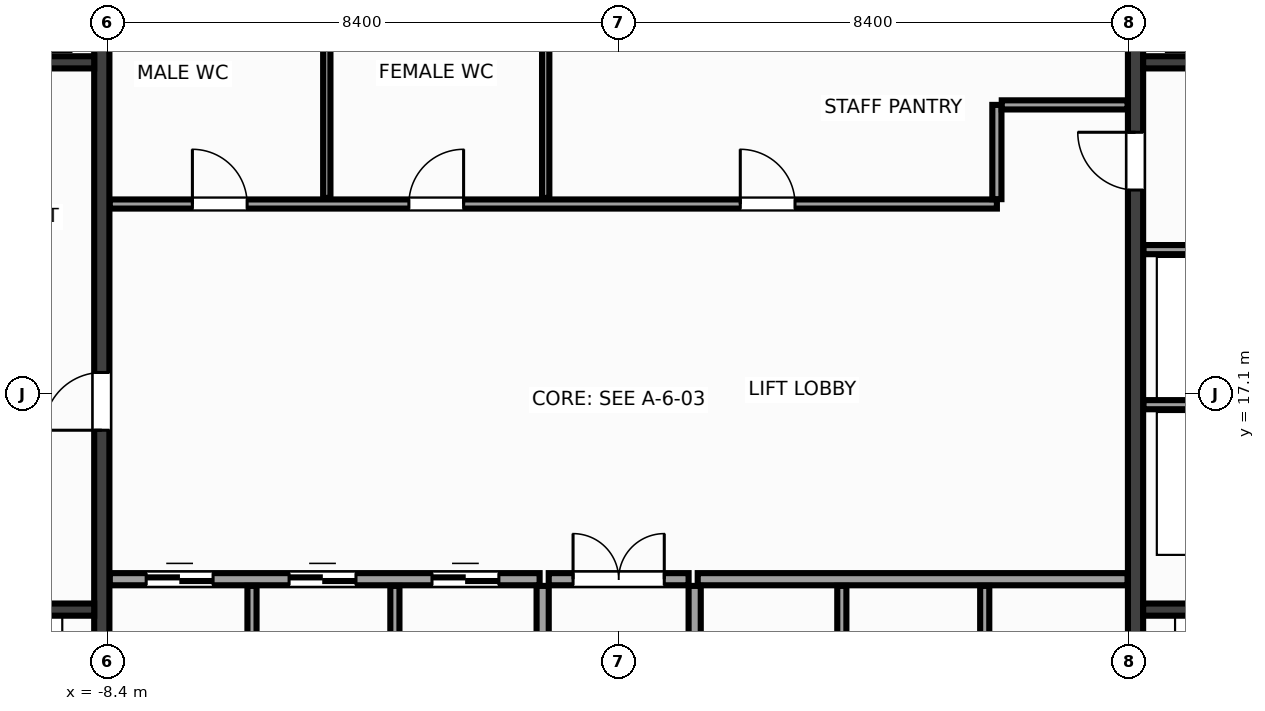
"""IFC4 building model, lengths in metres.
Left out: names, types, materials, properties, quantities, classifications, styles, units other than length and angle.
Written with IfcOpenShell. Run it as: python <this file> out.ifc"""

import sys

from ifc_helpers import new_model, si_unit, direction, frame, frame_2d, origin, place, context, subcontext, project, spatial, rectangle, extrude, source, transform, mapped, element, fill, save


model = new_model("IFC4")
c1 = context("Model", 3, precision=1e-05, world=origin(), true_north=direction((0.0, 1.0)))
c2 = subcontext(c1, "Body", "Model", "MODEL_VIEW")
j1 = project(units=[si_unit("LENGTHUNIT", "METRE"), si_unit("PLANEANGLEUNIT", "RADIAN")], contexts=[c1])
p1 = place(None, origin())
s1 = spatial("IfcSite", under=j1, at=p1, CompositionType="ELEMENT")
p2 = place(p1, origin())
s2 = spatial("IfcBuilding", under=s1, at=p2, CompositionType="ELEMENT")
p3 = place(p2, frame((0.0, 0.0, 30.8)))
s3 = spatial("IfcBuildingStorey", under=s2, at=p3, CompositionType="ELEMENT", Elevation=30.8)
m1 = source(origin(), c2, "Body", "SweptSolid", [
    extrude(rectangle(XDim=12.8, YDim=0.25, at=frame_2d((6.4, 0.0))), origin(), (0.0, 0.0, 1.0), 3.6),
])
p4 = place(p3, frame((-8.5, 10.6, 0.0), z_axis=(0.0, 0.0, 1.0), x_axis=(0.0, 1.0, 0.0)))
e1 = element("IfcWall", 1, at=p4, inside=s3, PredefinedType="SHEAR", context=c2, shape_type="MappedRepresentation", body=[
    mapped(m1, transform((0.0, 0.0, 0.0), x_axis=(1.0, 0.0, 0.0), y_axis=(0.0, 1.0, 0.0), z_axis=(0.0, 0.0, 1.0), scale=1.0)),
])
p5 = place(p4, frame((5.9, 0.0, 0.0)))
e2 = element("IfcOpeningElement", 2, at=p5, cuts=e1, PredefinedType="OPENING", context=c2, shape_type="SweptSolid", body=[
    extrude(rectangle(XDim=0.95, YDim=2.15, at=frame_2d((0.475, 1.075))), frame((0.0, 0.137, 0.0), z_axis=(0.0, -1.0, 0.0), x_axis=(1.0, 0.0, 0.0)), (0.0, 0.0, 1.0), 0.274),
])
p6 = place(p3, frame((8.5, 10.6, 0.0), z_axis=(0.0, 0.0, 1.0), x_axis=(0.0, 1.0, 0.0)))
e3 = element("IfcWall", 3, at=p6, inside=s3, PredefinedType="SHEAR", context=c2, shape_type="MappedRepresentation", body=[
    mapped(m1, transform((0.0, 0.0, 0.0), x_axis=(1.0, 0.0, 0.0), y_axis=(0.0, 1.0, 0.0), z_axis=(0.0, 0.0, 1.0), scale=1.0)),
])
p7 = place(p6, frame((9.85, 0.0, 0.0)))
e4 = element("IfcOpeningElement", 4, at=p7, cuts=e3, PredefinedType="OPENING", context=c2, shape_type="SweptSolid", body=[
    extrude(rectangle(XDim=0.95, YDim=2.15, at=frame_2d((0.475, 1.075))), frame((0.0, 0.137, 0.0), z_axis=(0.0, -1.0, 0.0), x_axis=(1.0, 0.0, 0.0)), (0.0, 0.0, 1.0), 0.274),
])
m2 = source(origin(), c2, "Body", "SweptSolid", [
    extrude(rectangle(XDim=2.825, YDim=0.2, at=frame_2d((1.413, 0.0))), origin(), (0.0, 0.0, 1.0), 3.6),
])
for number, where, z_axis, x_axis in (
    (5, (-11.45, 13.55, 0.0), (0.0, 0.0, 1.0), (1.0, 0.0, 0.0)),
    (6, (8.625, 13.55, 0.0), (0.0, 0.0, 1.0), (1.0, 0.0, 0.0)),
):
    element("IfcWall", number, at=place(p3, frame(where, z_axis=z_axis, x_axis=x_axis)), inside=s3, PredefinedType="SHEAR", context=c2, shape_type="MappedRepresentation", body=[
        mapped(m2, transform((0.0, 0.0, 0.0), x_axis=(1.0, 0.0, 0.0), y_axis=(0.0, 1.0, 0.0), z_axis=(0.0, 0.0, 1.0), scale=1.0)),
    ])
m3 = source(origin(), c2, "Body", "SweptSolid", [
    extrude(rectangle(XDim=3.02, YDim=0.2, at=frame_2d((1.51, 0.0))), origin(), (0.0, 0.0, 1.0), 3.6),
])
for number, where, z_axis, x_axis in (
    (7, (-11.645, 22.55, 0.0), (0.0, 0.0, 1.0), (1.0, 0.0, 0.0)),
    (8, (8.625, 22.55, 0.0), (0.0, 0.0, 1.0), (1.0, 0.0, 0.0)),
):
    element("IfcWall", number, at=place(p3, frame(where, z_axis=z_axis, x_axis=x_axis)), inside=s3, PredefinedType="SHEAR", context=c2, shape_type="MappedRepresentation", body=[
        mapped(m3, transform((0.0, 0.0, 0.0), x_axis=(1.0, 0.0, 0.0), y_axis=(0.0, 1.0, 0.0), z_axis=(0.0, 0.0, 1.0), scale=1.0)),
    ])
m4 = source(origin(), c2, "Body", "SweptSolid", [
    extrude(rectangle(XDim=3.01, YDim=0.15, at=frame_2d((1.505, 0.0))), origin(), (0.0, 0.0, 1.0), 3.36),
])
for number, where, z_axis, x_axis in (
    (9, (8.63, 16.92, 0.0), (0.0, 0.0, 1.0), (1.0, 0.0, 0.0)),
    (10, (8.63, 19.47, 0.0), (0.0, 0.0, 1.0), (1.0, 0.0, 0.0)),
):
    element("IfcWall", number, at=place(p3, frame(where, z_axis=z_axis, x_axis=x_axis)), inside=s3, PredefinedType="PARTITIONING", context=c2, shape_type="MappedRepresentation", body=[
        mapped(m4, transform((0.0, 0.0, 0.0), x_axis=(1.0, 0.0, 0.0), y_axis=(0.0, 1.0, 0.0), z_axis=(0.0, 0.0, 1.0), scale=1.0)),
    ])
m5 = source(origin(), c2, "Body", "SweptSolid", [
    extrude(rectangle(XDim=7.07, YDim=0.2, at=frame_2d((3.535, 0.0))), origin(), (0.0, 0.0, 1.0), 3.36),
])
p8 = place(p3, frame((-8.37, 14.05, 0.0), z_axis=(0.0, 0.0, 1.0), x_axis=(1.0, 0.0, 0.0)))
e11 = element("IfcWall", 11, at=p8, inside=s3, PredefinedType="PARTITIONING", context=c2, shape_type="MappedRepresentation", body=[
    mapped(m5, transform((0.0, 0.0, 0.0), x_axis=(1.0, 0.0, 0.0), y_axis=(0.0, 1.0, 0.0), z_axis=(0.0, 0.0, 1.0), scale=1.0)),
])
p9 = place(p8, frame((0.6, 0.0, 0.0)))
e12 = element("IfcOpeningElement", 12, at=p9, cuts=e11, PredefinedType="OPENING", context=c2, shape_type="SweptSolid", body=[
    extrude(rectangle(XDim=1.1, YDim=2.15, at=frame_2d((0.55, 1.075))), frame((0.0, 0.112, 0.0), z_axis=(0.0, -1.0, 0.0), x_axis=(1.0, 0.0, 0.0)), (0.0, 0.0, 1.0), 0.224),
])
p10 = place(p8, frame((2.95, 0.0, 0.0)))
e13 = element("IfcOpeningElement", 13, at=p10, cuts=e11, PredefinedType="OPENING", context=c2, shape_type="SweptSolid", body=[
    extrude(rectangle(XDim=1.1, YDim=2.15, at=frame_2d((0.55, 1.075))), frame((0.0, 0.112, 0.0), z_axis=(0.0, -1.0, 0.0), x_axis=(1.0, 0.0, 0.0)), (0.0, 0.0, 1.0), 0.224),
])
p11 = place(p8, frame((5.3, 0.0, 0.0)))
e14 = element("IfcOpeningElement", 14, at=p11, cuts=e11, PredefinedType="OPENING", context=c2, shape_type="SweptSolid", body=[
    extrude(rectangle(XDim=1.1, YDim=2.15, at=frame_2d((0.55, 1.075))), frame((0.0, 0.112, 0.0), z_axis=(0.0, -1.0, 0.0), x_axis=(1.0, 0.0, 0.0)), (0.0, 0.0, 1.0), 0.224),
])
p12 = place(p3, frame((1.3, 14.05, 0.0), z_axis=(0.0, 0.0, 1.0), x_axis=(1.0, 0.0, 0.0)))
e15 = element("IfcWall", 15, at=p12, inside=s3, PredefinedType="PARTITIONING", context=c2, shape_type="MappedRepresentation", body=[
    mapped(m5, transform((0.0, 0.0, 0.0), x_axis=(1.0, 0.0, 0.0), y_axis=(0.0, 1.0, 0.0), z_axis=(0.0, 0.0, 1.0), scale=1.0)),
])
m6 = source(origin(), c2, "Body", "SweptSolid", [
    extrude(rectangle(XDim=3.34, YDim=0.2, at=frame_2d((1.67, 0.0))), origin(), (0.0, 0.0, 1.0), 3.36),
])
for number, where, z_axis, x_axis in (
    (16, (-1.25, 10.6, 0.0), (0.0, 0.0, 1.0), (0.0, 1.0, 0.0)),
    (17, (1.25, 10.6, 0.0), (0.0, 0.0, 1.0), (0.0, 1.0, 0.0)),
):
    element("IfcWall", number, at=place(p3, frame(where, z_axis=z_axis, x_axis=x_axis)), inside=s3, PredefinedType="PARTITIONING", context=c2, shape_type="MappedRepresentation", body=[
        mapped(m6, transform((0.0, 0.0, 0.0), x_axis=(1.0, 0.0, 0.0), y_axis=(0.0, 1.0, 0.0), z_axis=(0.0, 0.0, 1.0), scale=1.0)),
    ])
m7 = source(origin(), c2, "Body", "SweptSolid", [
    extrude(rectangle(XDim=2.3, YDim=0.2, at=frame_2d((1.15, 0.0))), origin(), (0.0, 0.0, 1.0), 3.36),
])
p13 = place(p3, frame((-1.15, 14.05, 0.0), z_axis=(0.0, 0.0, 1.0), x_axis=(1.0, 0.0, 0.0)))
e18 = element("IfcWall", 18, at=p13, inside=s3, PredefinedType="PARTITIONING", context=c2, shape_type="MappedRepresentation", body=[
    mapped(m7, transform((0.0, 0.0, 0.0), x_axis=(1.0, 0.0, 0.0), y_axis=(0.0, 1.0, 0.0), z_axis=(0.0, 0.0, 1.0), scale=1.0)),
])
p14 = place(p13, frame((0.4, 0.0, 0.0)))
e19 = element("IfcOpeningElement", 19, at=p14, cuts=e18, PredefinedType="OPENING", context=c2, shape_type="SweptSolid", body=[
    extrude(rectangle(XDim=1.5, YDim=2.2, at=frame_2d((0.75, 1.1))), frame((0.0, 0.112, 0.0), z_axis=(0.0, -1.0, 0.0), x_axis=(1.0, 0.0, 0.0)), (0.0, 0.0, 1.0), 0.224),
])
m8 = source(origin(), c2, "Body", "SweptSolid", [
    extrude(rectangle(XDim=14.59, YDim=0.15, at=frame_2d((7.295, 0.0))), origin(), (0.0, 0.0, 1.0), 3.36),
])
p15 = place(p3, frame((-8.37, 20.22, 0.0), z_axis=(0.0, 0.0, 1.0), x_axis=(1.0, 0.0, 0.0)))
e20 = element("IfcWall", 20, at=p15, inside=s3, PredefinedType="PARTITIONING", context=c2, shape_type="MappedRepresentation", body=[
    mapped(m8, transform((0.0, 0.0, 0.0), x_axis=(1.0, 0.0, 0.0), y_axis=(0.0, 1.0, 0.0), z_axis=(0.0, 0.0, 1.0), scale=1.0)),
])
p16 = place(p15, frame((1.36, 0.0, 0.0)))
e21 = element("IfcOpeningElement", 21, at=p16, cuts=e20, PredefinedType="OPENING", context=c2, shape_type="SweptSolid", body=[
    extrude(rectangle(XDim=0.9, YDim=2.15, at=frame_2d((0.45, 1.075))), frame((0.0, 0.087, 0.0), z_axis=(0.0, -1.0, 0.0), x_axis=(1.0, 0.0, 0.0)), (0.0, 0.0, 1.0), 0.174),
])
p17 = place(p15, frame((4.92, 0.0, 0.0)))
e22 = element("IfcOpeningElement", 22, at=p17, cuts=e20, PredefinedType="OPENING", context=c2, shape_type="SweptSolid", body=[
    extrude(rectangle(XDim=0.9, YDim=2.15, at=frame_2d((0.45, 1.075))), frame((0.0, 0.087, 0.0), z_axis=(0.0, -1.0, 0.0), x_axis=(1.0, 0.0, 0.0)), (0.0, 0.0, 1.0), 0.174),
])
p18 = place(p15, frame((10.37, 0.0, 0.0)))
e23 = element("IfcOpeningElement", 23, at=p18, cuts=e20, PredefinedType="OPENING", context=c2, shape_type="SweptSolid", body=[
    extrude(rectangle(XDim=0.9, YDim=2.15, at=frame_2d((0.45, 1.075))), frame((0.0, 0.087, 0.0), z_axis=(0.0, -1.0, 0.0), x_axis=(1.0, 0.0, 0.0)), (0.0, 0.0, 1.0), 0.174),
])
m9 = source(origin(), c2, "Body", "SweptSolid", [
    extrude(rectangle(XDim=1.55, YDim=0.15, at=frame_2d((0.775, 0.0))), origin(), (0.0, 0.0, 1.0), 3.36),
])
p19 = place(p3, frame((6.22, 20.3, 0.0), z_axis=(0.0, 0.0, 1.0), x_axis=(0.0, 1.0, 0.0)))
e24 = element("IfcWall", 24, at=p19, inside=s3, PredefinedType="PARTITIONING", context=c2, shape_type="MappedRepresentation", body=[
    mapped(m9, transform((0.0, 0.0, 0.0), x_axis=(1.0, 0.0, 0.0), y_axis=(0.0, 1.0, 0.0), z_axis=(0.0, 0.0, 1.0), scale=1.0)),
])
m10 = source(origin(), c2, "Body", "SweptSolid", [
    extrude(rectangle(XDim=2.07, YDim=0.15, at=frame_2d((1.035, 0.0))), origin(), (0.0, 0.0, 1.0), 3.36),
])
p20 = place(p3, frame((6.3, 21.85, 0.0), z_axis=(0.0, 0.0, 1.0), x_axis=(1.0, 0.0, 0.0)))
e25 = element("IfcWall", 25, at=p20, inside=s3, PredefinedType="PARTITIONING", context=c2, shape_type="MappedRepresentation", body=[
    mapped(m10, transform((0.0, 0.0, 0.0), x_axis=(1.0, 0.0, 0.0), y_axis=(0.0, 1.0, 0.0), z_axis=(0.0, 0.0, 1.0), scale=1.0)),
])
m11 = source(origin(), c2, "Body", "SweptSolid", [
    extrude(rectangle(XDim=3.34, YDim=0.15, at=frame_2d((1.67, 0.0))), origin(), (0.0, 0.0, 1.0), 3.36),
])
for number, where, z_axis, x_axis in (
    (26, (-6.03, 10.6, 0.0), (0.0, 0.0, 1.0), (0.0, 1.0, 0.0)),
    (27, (-3.68, 10.6, 0.0), (0.0, 0.0, 1.0), (0.0, 1.0, 0.0)),
    (28, (3.67, 10.6, 0.0), (0.0, 0.0, 1.0), (0.0, 1.0, 0.0)),
    (29, (6.02, 10.6, 0.0), (0.0, 0.0, 1.0), (0.0, 1.0, 0.0)),
):
    element("IfcWall", number, at=place(p3, frame(where, z_axis=z_axis, x_axis=x_axis)), inside=s3, PredefinedType="PARTITIONING", context=c2, shape_type="MappedRepresentation", body=[
        mapped(m11, transform((0.0, 0.0, 0.0), x_axis=(1.0, 0.0, 0.0), y_axis=(0.0, 1.0, 0.0), z_axis=(0.0, 0.0, 1.0), scale=1.0)),
    ])
m12 = source(origin(), c2, "Body", "SweptSolid", [
    extrude(rectangle(XDim=3.04, YDim=0.12, at=frame_2d((1.52, 0.0))), origin(), (0.0, 0.0, 1.0), 3.36),
])
for number, where, z_axis, x_axis in (
    (30, (-4.8, 20.32, 0.0), (0.0, 0.0, 1.0), (0.0, 1.0, 0.0)),
    (31, (-1.2, 20.32, 0.0), (0.0, 0.0, 1.0), (0.0, 1.0, 0.0)),
):
    element("IfcWall", number, at=place(p3, frame(where, z_axis=z_axis, x_axis=x_axis)), inside=s3, PredefinedType="PARTITIONING", context=c2, shape_type="MappedRepresentation", body=[
        mapped(m12, transform((0.0, 0.0, 0.0), x_axis=(1.0, 0.0, 0.0), y_axis=(0.0, 1.0, 0.0), z_axis=(0.0, 0.0, 1.0), scale=1.0)),
    ])
m13 = source(origin(), c2, "Body", "SweptSolid", [
    extrude(rectangle(XDim=0.95, YDim=2.15, at=frame_2d((0.475, 1.075))), frame((0.0, 0.025, 0.0), z_axis=(0.0, -1.0, 0.0), x_axis=(1.0, 0.0, 0.0)), (0.0, 0.0, 1.0), 0.05),
])
p21 = place(p5, origin())
e32 = element("IfcDoor", 32, at=p21, inside=s3, OperationType="SINGLE_SWING_LEFT", PredefinedType="DOOR", context=c2, shape_type="MappedRepresentation", body=[
    mapped(m13, transform((0.0, 0.0, 0.0), x_axis=(1.0, 0.0, 0.0), y_axis=(0.0, 1.0, 0.0), z_axis=(0.0, 0.0, 1.0), scale=1.0)),
])
fill(e2, e32)
m14 = source(origin(), c2, "Body", "SweptSolid", [
    extrude(rectangle(XDim=0.95, YDim=2.15, at=frame_2d((0.475, 1.075))), frame((0.0, 0.025, 0.0), z_axis=(0.0, -1.0, 0.0), x_axis=(1.0, 0.0, 0.0)), (0.0, 0.0, 1.0), 0.05),
])
p22 = place(p7, origin())
e33 = element("IfcDoor", 33, at=p22, inside=s3, OperationType="SINGLE_SWING_RIGHT", PredefinedType="DOOR", context=c2, shape_type="MappedRepresentation", body=[
    mapped(m14, transform((0.0, 0.0, 0.0), x_axis=(1.0, 0.0, 0.0), y_axis=(0.0, 1.0, 0.0), z_axis=(0.0, 0.0, 1.0), scale=1.0)),
])
fill(e4, e33)
m15 = source(origin(), c2, "Body", "SweptSolid", [
    extrude(rectangle(XDim=1.1, YDim=2.15, at=frame_2d((0.55, 1.075))), frame((0.0, 0.025, 0.0), z_axis=(0.0, -1.0, 0.0), x_axis=(1.0, 0.0, 0.0)), (0.0, 0.0, 1.0), 0.05),
])
p23 = place(p9, origin())
e34 = element("IfcDoor", 34, at=p23, inside=s3, OperationType="DOUBLE_DOOR_SLIDING", PredefinedType="DOOR", context=c2, shape_type="MappedRepresentation", body=[
    mapped(m15, transform((0.0, 0.0, 0.0), x_axis=(1.0, 0.0, 0.0), y_axis=(0.0, 1.0, 0.0), z_axis=(0.0, 0.0, 1.0), scale=1.0)),
])
fill(e12, e34)
p24 = place(p10, origin())
e35 = element("IfcDoor", 35, at=p24, inside=s3, OperationType="DOUBLE_DOOR_SLIDING", PredefinedType="DOOR", context=c2, shape_type="MappedRepresentation", body=[
    mapped(m15, transform((0.0, 0.0, 0.0), x_axis=(1.0, 0.0, 0.0), y_axis=(0.0, 1.0, 0.0), z_axis=(0.0, 0.0, 1.0), scale=1.0)),
])
fill(e13, e35)
p25 = place(p11, origin())
e36 = element("IfcDoor", 36, at=p25, inside=s3, OperationType="DOUBLE_DOOR_SLIDING", PredefinedType="DOOR", context=c2, shape_type="MappedRepresentation", body=[
    mapped(m15, transform((0.0, 0.0, 0.0), x_axis=(1.0, 0.0, 0.0), y_axis=(0.0, 1.0, 0.0), z_axis=(0.0, 0.0, 1.0), scale=1.0)),
])
fill(e14, e36)
m16 = source(origin(), c2, "Body", "SweptSolid", [
    extrude(rectangle(XDim=1.5, YDim=2.2, at=frame_2d((0.75, 1.1))), frame((0.0, 0.025, 0.0), z_axis=(0.0, -1.0, 0.0), x_axis=(1.0, 0.0, 0.0)), (0.0, 0.0, 1.0), 0.05),
])
p26 = place(p14, origin())
e37 = element("IfcDoor", 37, at=p26, inside=s3, OperationType="DOUBLE_DOOR_SINGLE_SWING", PredefinedType="DOOR", context=c2, shape_type="MappedRepresentation", body=[
    mapped(m16, transform((0.0, 0.0, 0.0), x_axis=(1.0, 0.0, 0.0), y_axis=(0.0, 1.0, 0.0), z_axis=(0.0, 0.0, 1.0), scale=1.0)),
])
fill(e19, e37)
m17 = source(origin(), c2, "Body", "SweptSolid", [
    extrude(rectangle(XDim=0.9, YDim=2.15, at=frame_2d((0.45, 1.075))), frame((0.0, 0.025, 0.0), z_axis=(0.0, -1.0, 0.0), x_axis=(1.0, 0.0, 0.0)), (0.0, 0.0, 1.0), 0.05),
])
p27 = place(p16, origin())
e38 = element("IfcDoor", 38, at=p27, inside=s3, OperationType="SINGLE_SWING_LEFT", PredefinedType="DOOR", context=c2, shape_type="MappedRepresentation", body=[
    mapped(m17, transform((0.0, 0.0, 0.0), x_axis=(1.0, 0.0, 0.0), y_axis=(0.0, 1.0, 0.0), z_axis=(0.0, 0.0, 1.0), scale=1.0)),
])
fill(e21, e38)
p28 = place(p17, origin())
e39 = element("IfcDoor", 39, at=p28, inside=s3, OperationType="SINGLE_SWING_RIGHT", PredefinedType="DOOR", context=c2, shape_type="MappedRepresentation", body=[
    mapped(m17, transform((0.0, 0.0, 0.0), x_axis=(1.0, 0.0, 0.0), y_axis=(0.0, 1.0, 0.0), z_axis=(0.0, 0.0, 1.0), scale=1.0)),
])
fill(e22, e39)
p29 = place(p18, origin())
e40 = element("IfcDoor", 40, at=p29, inside=s3, OperationType="SINGLE_SWING_LEFT", PredefinedType="DOOR", context=c2, shape_type="MappedRepresentation", body=[
    mapped(m17, transform((0.0, 0.0, 0.0), x_axis=(1.0, 0.0, 0.0), y_axis=(0.0, 1.0, 0.0), z_axis=(0.0, 0.0, 1.0), scale=1.0)),
])
fill(e23, e40)
save(model, sys.argv[1])
